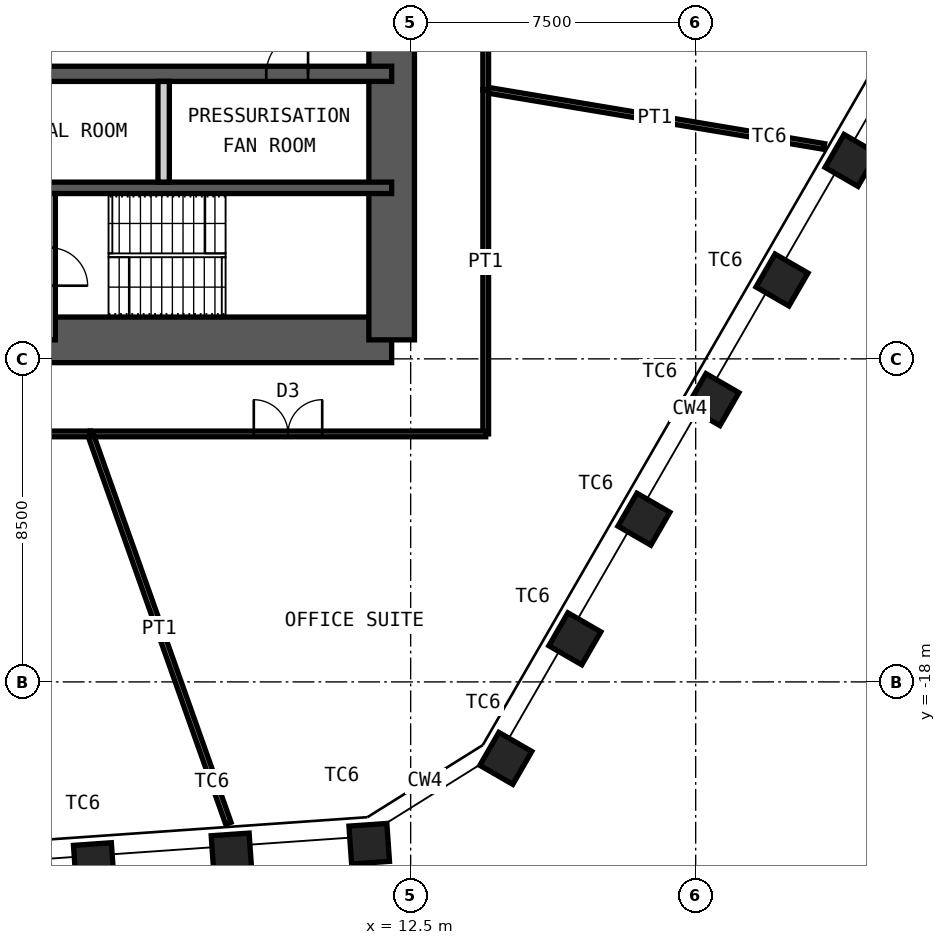
"""IFC4 building model, lengths in metres.
Left out: names, types, materials, properties, quantities, classifications, styles, units other than length and angle.
Written with IfcOpenShell. Run it as: python <this file> out.ifc"""

import sys

from ifc_helpers import new_model, si_unit, direction, frame, frame_2d, origin, origin_2d, place, context, subcontext, project, spatial, rectangle, hollow_rectangle, extrude, element, fill, save


model = new_model("IFC4")
c1 = context("Model", 3, precision=1e-05, world=origin(), true_north=direction((0.0, 1.0)))
c2 = subcontext(c1, "Body", "Model", "MODEL_VIEW")
j1 = project(units=[si_unit("LENGTHUNIT", "METRE"), si_unit("PLANEANGLEUNIT", "RADIAN")], contexts=[c1])
p1 = place(None, origin())
s1 = spatial("IfcSite", under=j1, at=p1, CompositionType="ELEMENT")
p2 = place(p1, origin())
s2 = spatial("IfcBuilding", under=s1, at=p2, CompositionType="ELEMENT")
p3 = place(p2, frame((0.0, 0.0, 247.6)))
s3 = spatial("IfcBuildingStorey", under=s2, at=p3, CompositionType="ELEMENT", Elevation=247.6)
for number, where, z_axis, x_axis in (
    (1, (24.088, -4.279, 0.0), (0.0, 0.0, 1.0), (0.5, 0.866, 0.0)),
    (2, (22.271, -7.426, 0.0), (0.0, 0.0, 1.0), (0.5, 0.866, 0.0)),
    (3, (20.454, -10.572, 0.0), (0.0, 0.0, 1.0), (0.5, 0.866, 0.0)),
    (4, (18.637, -13.719, 0.0), (0.0, 0.0, 1.0), (0.5, 0.866, 0.0)),
    (5, (16.821, -16.866, 0.0), (0.0, 0.0, 1.0), (0.5, 0.866, 0.0)),
    (6, (15.004, -20.012, 0.0), (0.0, 0.0, 1.0), (0.5, 0.866, 0.0)),
    (7, (11.41, -22.258, 0.0), (0.0, 0.0, 1.0), (0.998, 0.07, 0.0)),
    (8, (7.785, -22.512, 0.0), (0.0, 0.0, 1.0), (0.998, 0.07, 0.0)),
    (9, (4.16, -22.765, 0.0), (0.0, 0.0, 1.0), (0.998, 0.07, 0.0)),
):
    element("IfcColumn", number, at=place(p3, frame(where, z_axis=z_axis, x_axis=x_axis)), inside=s3, PredefinedType="COLUMN", context=c2, shape_type="SweptSolid", body=[
        extrude(hollow_rectangle(XDim=1.0, YDim=1.0, WallThickness=0.06, at=origin_2d()), origin(), (0.0, 0.0, 1.0), 4.2),
    ])
p4 = place(p3, frame((-12.0, -9.0, 0.0), z_axis=(0.0, 0.0, 1.0), x_axis=(1.0, 0.0, 0.0)))
e10 = element("IfcWall", 10, at=p4, inside=s3, PredefinedType="SHEAR", context=c2, shape_type="SweptSolid", body=[
    extrude(rectangle(XDim=24.0, YDim=1.2, at=frame_2d((12.0, 0.0))), origin(), (0.0, 0.0, 1.0), 4.2),
])
p5 = place(p4, frame((1.35, 0.0, 0.0)))
e11 = element("IfcOpeningElement", 11, at=p5, cuts=e10, PredefinedType="OPENING", context=c2, shape_type="SweptSolid", body=[
    extrude(rectangle(XDim=1.0, YDim=2.1, at=frame_2d((0.5, 1.05))), frame((0.0, 0.61, 0.0), z_axis=(0.0, -1.0, 0.0), x_axis=(1.0, 0.0, 0.0)), (0.0, 0.0, 1.0), 1.22),
])
p6 = place(p4, frame((5.325, 0.0, 0.0)))
e12 = element("IfcOpeningElement", 12, at=p6, cuts=e10, PredefinedType="OPENING", context=c2, shape_type="SweptSolid", body=[
    extrude(rectangle(XDim=1.15, YDim=2.1, at=frame_2d((0.575, 1.05))), frame((0.0, 0.61, 0.0), z_axis=(0.0, -1.0, 0.0), x_axis=(1.0, 0.0, 0.0)), (0.0, 0.0, 1.0), 1.22),
])
p7 = place(p4, frame((12.6, 0.0, 0.0)))
e13 = element("IfcOpeningElement", 13, at=p7, cuts=e10, PredefinedType="OPENING", context=c2, shape_type="SweptSolid", body=[
    extrude(rectangle(XDim=1.0, YDim=2.1, at=frame_2d((0.5, 1.05))), frame((0.0, 0.61, 0.0), z_axis=(0.0, -1.0, 0.0), x_axis=(1.0, 0.0, 0.0)), (0.0, 0.0, 1.0), 1.22),
])
p8 = place(p3, frame((12.0, -9.0, 0.0), z_axis=(0.0, 0.0, 1.0), x_axis=(0.0, 1.0, 0.0)))
e14 = element("IfcWall", 14, at=p8, inside=s3, PredefinedType="SHEAR", context=c2, shape_type="SweptSolid", body=[
    extrude(rectangle(XDim=18.0, YDim=1.2, at=frame_2d((9.0, 0.0))), origin(), (0.0, 0.0, 1.0), 4.2),
])
p9 = place(p8, frame((8.1, 0.0, 0.0)))
e15 = element("IfcOpeningElement", 15, at=p9, cuts=e14, PredefinedType="OPENING", context=c2, shape_type="SweptSolid", body=[
    extrude(rectangle(XDim=1.8, YDim=2.1, at=frame_2d((0.9, 1.05))), frame((0.0, 0.61, 0.0), z_axis=(0.0, -1.0, 0.0), x_axis=(1.0, 0.0, 0.0)), (0.0, 0.0, 1.0), 1.22),
])
p10 = place(p3, frame((-12.0, -2.0, 0.0), z_axis=(0.0, 0.0, 1.0), x_axis=(1.0, 0.0, 0.0)))
e16 = element("IfcWall", 16, at=p10, inside=s3, PredefinedType="SHEAR", context=c2, shape_type="SweptSolid", body=[
    extrude(rectangle(XDim=24.0, YDim=0.4, at=frame_2d((12.0, 0.0))), origin(), (0.0, 0.0, 1.0), 4.2),
])
p11 = place(p10, frame((1.1, 0.0, 0.0)))
e17 = element("IfcOpeningElement", 17, at=p11, cuts=e16, PredefinedType="OPENING", context=c2, shape_type="SweptSolid", body=[
    extrude(rectangle(XDim=1.1, YDim=2.1, at=frame_2d((0.55, 1.05))), frame((0.0, 0.21, 0.0), z_axis=(0.0, -1.0, 0.0), x_axis=(1.0, 0.0, 0.0)), (0.0, 0.0, 1.0), 0.42),
])
p12 = place(p10, frame((13.55, 0.0, 0.0)))
e18 = element("IfcOpeningElement", 18, at=p12, cuts=e16, PredefinedType="OPENING", context=c2, shape_type="SweptSolid", body=[
    extrude(rectangle(XDim=1.1, YDim=2.1, at=frame_2d((0.55, 1.05))), frame((0.0, 0.21, 0.0), z_axis=(0.0, -1.0, 0.0), x_axis=(1.0, 0.0, 0.0)), (0.0, 0.0, 1.0), 0.42),
])
p13 = place(p10, frame((20.7, 0.0, 0.0)))
e19 = element("IfcOpeningElement", 19, at=p13, cuts=e16, PredefinedType="OPENING", context=c2, shape_type="SweptSolid", body=[
    extrude(rectangle(XDim=1.1, YDim=2.1, at=frame_2d((0.55, 1.05))), frame((0.0, 0.21, 0.0), z_axis=(0.0, -1.0, 0.0), x_axis=(1.0, 0.0, 0.0)), (0.0, 0.0, 1.0), 0.42),
])
p14 = place(p10, frame((4.0, 0.0, 0.0)))
e20 = element("IfcOpeningElement", 20, at=p14, cuts=e16, PredefinedType="OPENING", context=c2, shape_type="SweptSolid", body=[
    extrude(rectangle(XDim=1.0, YDim=2.1, at=frame_2d((0.5, 1.05))), frame((0.0, 0.21, 0.0), z_axis=(0.0, -1.0, 0.0), x_axis=(1.0, 0.0, 0.0)), (0.0, 0.0, 1.0), 0.42),
])
p15 = place(p10, frame((6.8, 0.0, 0.0)))
e21 = element("IfcOpeningElement", 21, at=p15, cuts=e16, PredefinedType="OPENING", context=c2, shape_type="SweptSolid", body=[
    extrude(rectangle(XDim=1.0, YDim=2.1, at=frame_2d((0.5, 1.05))), frame((0.0, 0.21, 0.0), z_axis=(0.0, -1.0, 0.0), x_axis=(1.0, 0.0, 0.0)), (0.0, 0.0, 1.0), 0.42),
])
p16 = place(p3, frame((-12.0, -5.0, 0.0), z_axis=(0.0, 0.0, 1.0), x_axis=(1.0, 0.0, 0.0)))
e22 = element("IfcWall", 22, at=p16, inside=s3, PredefinedType="SHEAR", context=c2, shape_type="SweptSolid", body=[
    extrude(rectangle(XDim=24.0, YDim=0.3, at=frame_2d((12.0, 0.0))), origin(), (0.0, 0.0, 1.0), 4.2),
])
p17 = place(p3, frame((6.0, -4.85, 0.0), z_axis=(0.0, 0.0, 1.0), x_axis=(0.0, 1.0, 0.0)))
e23 = element("IfcWall", 23, at=p17, inside=s3, PredefinedType="PARTITIONING", context=c2, shape_type="SweptSolid", body=[
    extrude(rectangle(XDim=2.65, YDim=0.3, at=frame_2d((1.325, 0.0))), origin(), (0.0, 0.0, 1.0), 3.98),
])
p18 = place(p3, frame((3.0, -9.0, 0.0), z_axis=(0.0, 0.0, 1.0), x_axis=(0.0, 1.0, 0.0)))
e24 = element("IfcWall", 24, at=p18, inside=s3, PredefinedType="PARTITIONING", context=c2, shape_type="SweptSolid", body=[
    extrude(rectangle(XDim=3.85, YDim=0.3, at=frame_2d((1.925, 0.0))), origin(), (0.0, 0.0, 1.0), 3.98),
])
p19 = place(p18, frame((1.425, 0.0, 0.0)))
e25 = element("IfcOpeningElement", 25, at=p19, cuts=e24, PredefinedType="OPENING", context=c2, shape_type="SweptSolid", body=[
    extrude(rectangle(XDim=1.0, YDim=2.1, at=frame_2d((0.5, 1.05))), frame((0.0, 0.16, 0.0), z_axis=(0.0, -1.0, 0.0), x_axis=(1.0, 0.0, 0.0)), (0.0, 0.0, 1.0), 0.32),
])
p20 = place(p3, frame((23.383, -3.912, 0.0), z_axis=(0.0, 0.0, 1.0), x_axis=(-0.986293651891, 0.164999491631, 0.0)))
e26 = element("IfcWall", 26, at=p20, inside=s3, PredefinedType="PARTITIONING", context=c2, shape_type="SweptSolid", body=[
    extrude(rectangle(XDim=9.032, YDim=0.15, at=frame_2d((4.516, 0.0))), origin(), (0.0, 0.0, 1.0), 2.93),
])
p21 = place(p3, frame((14.475, -2.422, 0.0), z_axis=(0.0, 0.0, 1.0), x_axis=(0.0, -1.0, 0.0)))
e27 = element("IfcWall", 27, at=p21, inside=s3, PredefinedType="PARTITIONING", context=c2, shape_type="SweptSolid", body=[
    extrude(rectangle(XDim=9.053, YDim=0.15, at=frame_2d((4.527, 0.0))), origin(), (0.0, 0.0, 1.0), 4.03),
])
p22 = place(p3, frame((14.475, -11.475, 0.0), z_axis=(0.0, 0.0, 1.0), x_axis=(-1.0, 0.0, 0.0)))
e28 = element("IfcWall", 28, at=p22, inside=s3, PredefinedType="PARTITIONING", context=c2, shape_type="SweptSolid", body=[
    extrude(rectangle(XDim=10.406, YDim=0.15, at=frame_2d((5.203, 0.0))), origin(), (0.0, 0.0, 1.0), 4.03),
])
p23 = place(p22, frame((4.303, 0.0, 0.0)))
e29 = element("IfcOpeningElement", 29, at=p23, cuts=e28, PredefinedType="OPENING", context=c2, shape_type="SweptSolid", body=[
    extrude(rectangle(XDim=1.8, YDim=2.4, at=frame_2d((0.9, 1.2))), frame((0.0, 0.085, 0.0), z_axis=(0.0, -1.0, 0.0), x_axis=(1.0, 0.0, 0.0)), (0.0, 0.0, 1.0), 0.17),
])
p24 = place(p3, frame((7.703, -21.719, 0.0), z_axis=(0.0, 0.0, 1.0), x_axis=(-0.334269551553, 0.942477515331, 0.0)))
e30 = element("IfcWall", 30, at=p24, inside=s3, PredefinedType="PARTITIONING", context=c2, shape_type="SweptSolid", body=[
    extrude(rectangle(XDim=10.869, YDim=0.15, at=frame_2d((5.435, 0.0))), origin(), (0.0, 0.0, 1.0), 2.93),
])
p25 = place(p3, frame((4.07, -11.475, 0.0), z_axis=(0.0, 0.0, 1.0), x_axis=(-1.0, 0.0, 0.0)))
e31 = element("IfcWall", 31, at=p25, inside=s3, PredefinedType="PARTITIONING", context=c2, shape_type="SweptSolid", body=[
    extrude(rectangle(XDim=13.528, YDim=0.15, at=frame_2d((6.764, 0.0))), origin(), (0.0, 0.0, 1.0), 4.03),
])
p26 = place(p25, frame((5.864, 0.0, 0.0)))
e32 = element("IfcOpeningElement", 32, at=p26, cuts=e31, PredefinedType="OPENING", context=c2, shape_type="SweptSolid", body=[
    extrude(rectangle(XDim=1.8, YDim=2.4, at=frame_2d((0.9, 1.2))), frame((0.0, 0.085, 0.0), z_axis=(0.0, -1.0, 0.0), x_axis=(1.0, 0.0, 0.0)), (0.0, 0.0, 1.0), 0.17),
])
p27 = place(p3, frame((14.475, 3.475, 0.0), z_axis=(0.0, 0.0, 1.0), x_axis=(0.0, -1.0, 0.0)))
e33 = element("IfcWall", 33, at=p27, inside=s3, PredefinedType="PARTITIONING", context=c2, shape_type="SweptSolid", body=[
    extrude(rectangle(XDim=5.896, YDim=0.15, at=frame_2d((2.948, 0.0))), origin(), (0.0, 0.0, 1.0), 4.03),
])
p28 = place(p27, frame((2.448, 0.0, 0.0)))
e34 = element("IfcOpeningElement", 34, at=p28, cuts=e33, PredefinedType="OPENING", context=c2, shape_type="SweptSolid", body=[
    extrude(rectangle(XDim=1.0, YDim=2.4, at=frame_2d((0.5, 1.2))), frame((0.0, 0.085, 0.0), z_axis=(0.0, -1.0, 0.0), x_axis=(1.0, 0.0, 0.0)), (0.0, 0.0, 1.0), 0.17),
])
p29 = place(p13, origin())
e35 = element("IfcDoor", 35, at=p29, inside=s3, OperationType="SINGLE_SWING_LEFT", PredefinedType="DOOR", context=c2, shape_type="SweptSolid", body=[
    extrude(rectangle(XDim=1.1, YDim=2.1, at=frame_2d((0.55, 1.05))), frame((0.0, 0.025, 0.0), z_axis=(0.0, -1.0, 0.0), x_axis=(1.0, 0.0, 0.0)), (0.0, 0.0, 1.0), 0.05),
])
fill(e19, e35)
p30 = place(p23, origin())
e36 = element("IfcDoor", 36, at=p30, inside=s3, OperationType="DOUBLE_DOOR_DOUBLE_SWING", PredefinedType="DOOR", context=c2, shape_type="SweptSolid", body=[
    extrude(rectangle(XDim=1.8, YDim=2.4, at=frame_2d((0.9, 1.2))), frame((0.0, 0.025, 0.0), z_axis=(0.0, -1.0, 0.0), x_axis=(1.0, 0.0, 0.0)), (0.0, 0.0, 1.0), 0.05),
])
fill(e29, e36)
save(model, sys.argv[1])
